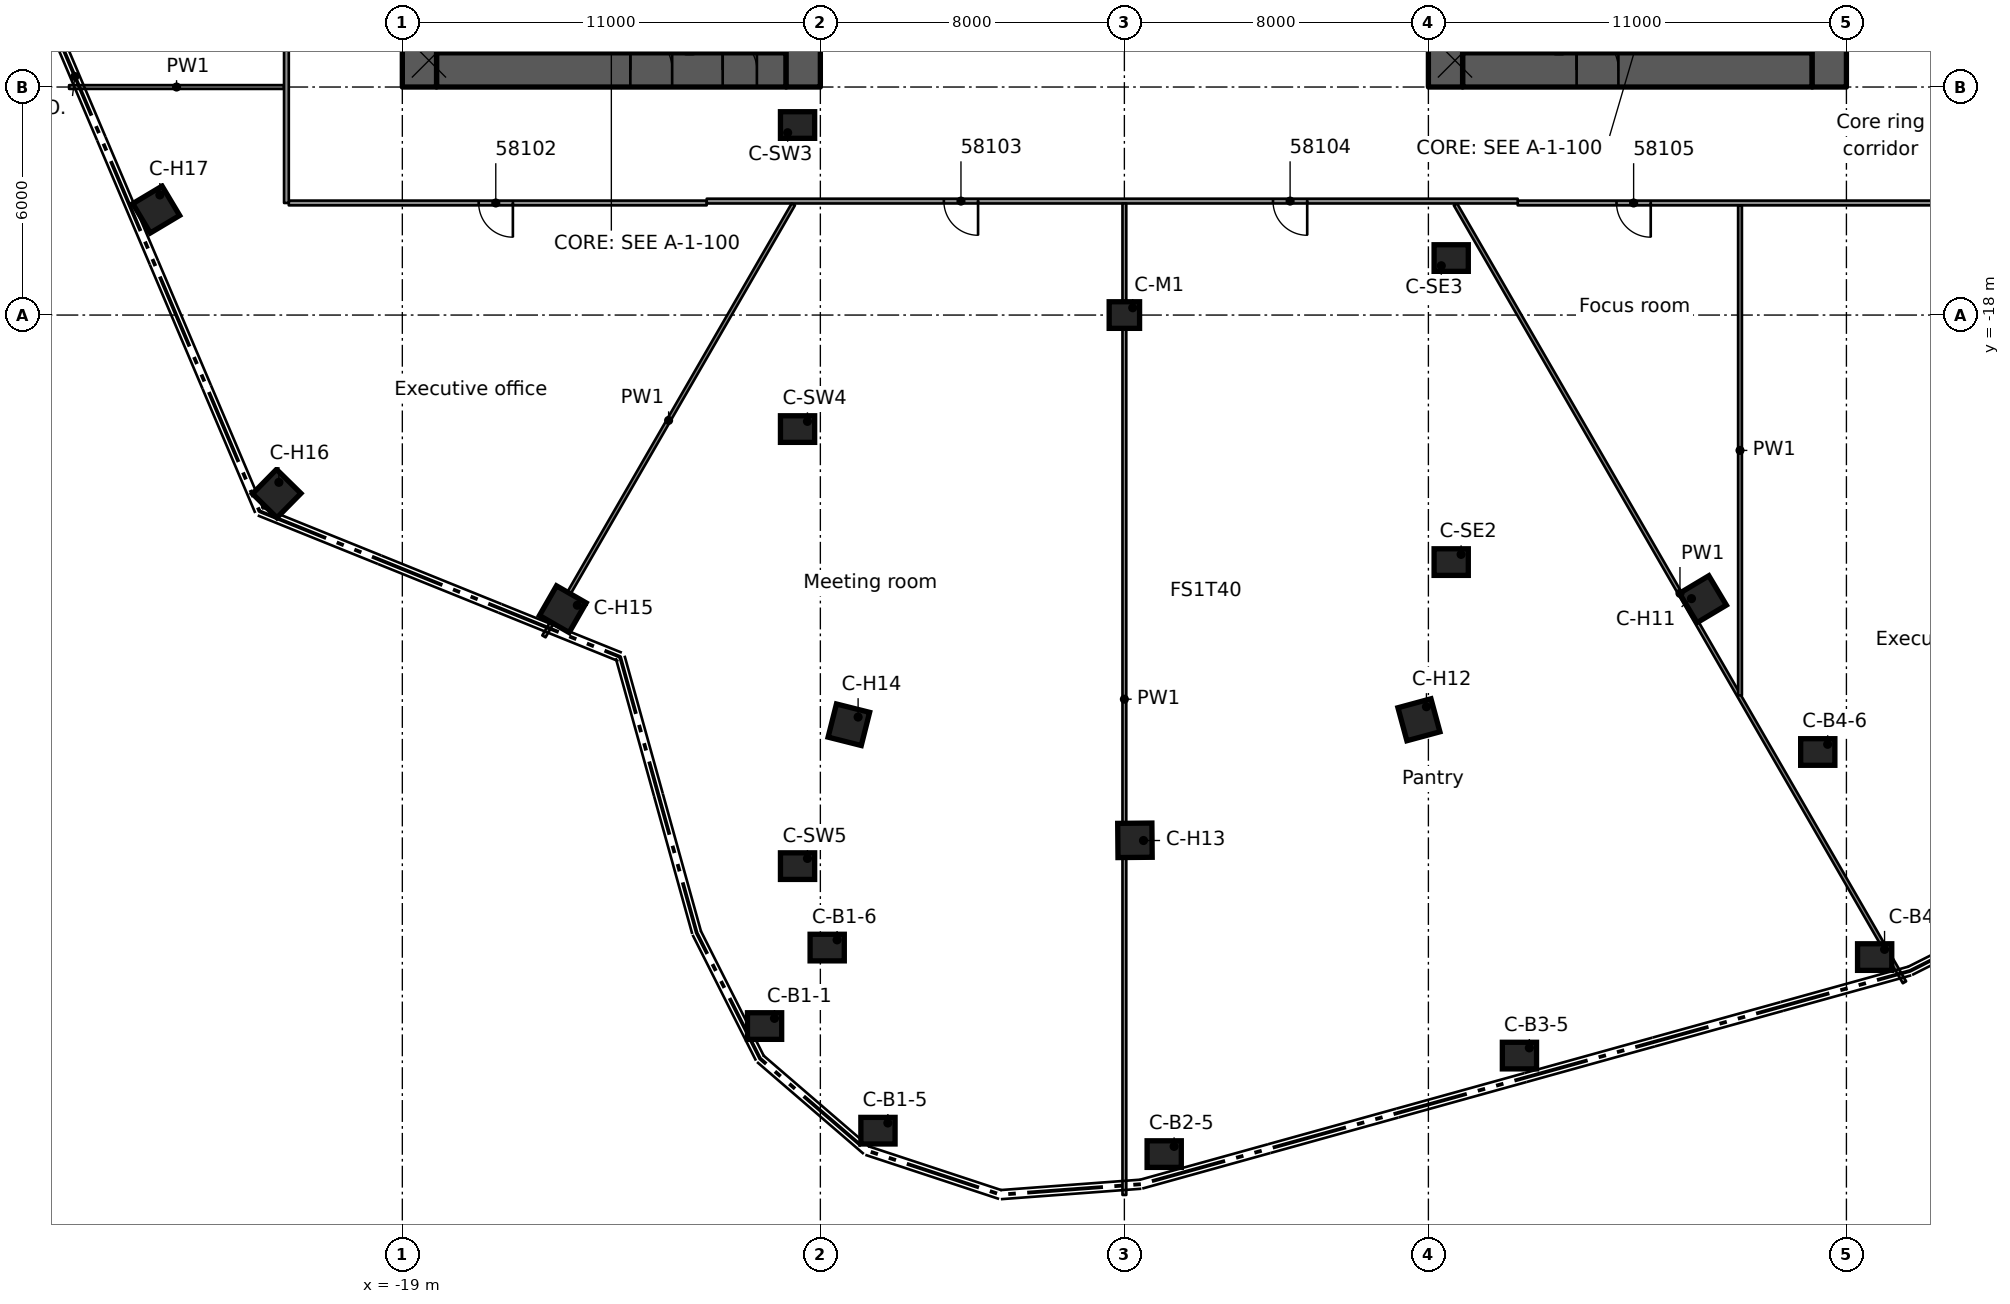
"""IFC4 building model, lengths in metres.
Left out: names, types, materials, properties, quantities, classifications, styles, units other than length and angle.
Written with IfcOpenShell. Run it as: python <this file> out.ifc"""

import sys

from ifc_helpers import new_model, si_unit, direction, frame, frame_2d, origin, origin_2d, place, context, subcontext, project, spatial, rectangle, extrude, element, fill, save


model = new_model("IFC4")
c1 = context("Model", 3, precision=1e-05, world=origin(), true_north=direction((0.0, 1.0)))
c2 = subcontext(c1, "Body", "Model", "MODEL_VIEW")
j1 = project(units=[si_unit("LENGTHUNIT", "METRE"), si_unit("PLANEANGLEUNIT", "RADIAN")], contexts=[c1])
p1 = place(None, origin())
s1 = spatial("IfcSite", under=j1, at=p1, CompositionType="ELEMENT")
p2 = place(p1, origin())
s2 = spatial("IfcBuilding", under=s1, at=p2, CompositionType="ELEMENT")
p3 = place(p2, frame((0.0, 0.0, 285.9)))
s3 = spatial("IfcBuildingStorey", under=s2, at=p3, CompositionType="ELEMENT", Elevation=285.9)
p4 = place(p3, frame((-18.1, -11.55, 0.0), z_axis=(0.0, 0.0, 1.0), x_axis=(1.0, 0.0, 0.0)))
e1 = element("IfcWall", 1, at=p4, inside=s3, PredefinedType="SHEAR", context=c2, shape_type="SweptSolid", body=[
    extrude(rectangle(XDim=9.2, YDim=0.9, at=frame_2d((4.6, 0.0))), origin(), (0.0, 0.0, 1.0), 3.5),
])
p5 = place(p4, frame((5.1, 0.0, 0.0)))
e2 = element("IfcOpeningElement", 2, at=p5, cuts=e1, PredefinedType="OPENING", context=c2, shape_type="SweptSolid", body=[
    extrude(rectangle(XDim=1.1, YDim=2.1, at=frame_2d((0.55, 1.05))), frame((0.0, 0.46, 0.0), z_axis=(0.0, -1.0, 0.0), x_axis=(1.0, 0.0, 0.0)), (0.0, 0.0, 1.0), 0.92),
])
p6 = place(p4, frame((7.53, 0.0, 0.0)))
e3 = element("IfcOpeningElement", 3, at=p6, cuts=e1, PredefinedType="OPENING", context=c2, shape_type="SweptSolid", body=[
    extrude(rectangle(XDim=0.9, YDim=2.1, at=frame_2d((0.45, 1.05))), frame((0.0, 0.46, 0.0), z_axis=(0.0, -1.0, 0.0), x_axis=(1.0, 0.0, 0.0)), (0.0, 0.0, 1.0), 0.92),
])
p7 = place(p3, frame((-18.55, -12.0, 0.0), z_axis=(0.0, 0.0, 1.0), x_axis=(0.0, 1.0, 0.0)))
e4 = element("IfcWall", 4, at=p7, inside=s3, PredefinedType="SHEAR", context=c2, shape_type="SweptSolid", body=[
    extrude(rectangle(XDim=24.0, YDim=0.9, at=frame_2d((12.0, 0.0))), origin(), (0.0, 0.0, 1.0), 3.5),
])
p8 = place(p7, frame((10.1, 0.0, 0.0)))
e5 = element("IfcOpeningElement", 5, at=p8, cuts=e4, PredefinedType="OPENING", context=c2, shape_type="SweptSolid", body=[
    extrude(rectangle(XDim=1.8, YDim=2.1, at=frame_2d((0.9, 1.05))), frame((0.0, 0.46, 0.0), z_axis=(0.0, -1.0, 0.0), x_axis=(1.0, 0.0, 0.0)), (0.0, 0.0, 1.0), 0.92),
])
p9 = place(p3, frame((-8.45, -12.0, 0.0), z_axis=(0.0, 0.0, 1.0), x_axis=(0.0, 1.0, 0.0)))
e6 = element("IfcWall", 6, at=p9, inside=s3, PredefinedType="SHEAR", context=c2, shape_type="SweptSolid", body=[
    extrude(rectangle(XDim=24.0, YDim=0.9, at=frame_2d((12.0, 0.0))), origin(), (0.0, 0.0, 1.0), 3.5),
])
p10 = place(p9, frame((9.6, 0.0, 0.0)))
e7 = element("IfcOpeningElement", 7, at=p10, cuts=e6, PredefinedType="OPENING", context=c2, shape_type="SweptSolid", body=[
    extrude(rectangle(XDim=1.8, YDim=2.1, at=frame_2d((0.9, 1.05))), frame((0.0, 0.46, 0.0), z_axis=(0.0, -1.0, 0.0), x_axis=(1.0, 0.0, 0.0)), (0.0, 0.0, 1.0), 0.92),
])
p11 = place(p9, frame((19.65, 0.0, 0.0)))
e8 = element("IfcOpeningElement", 8, at=p11, cuts=e6, PredefinedType="OPENING", context=c2, shape_type="SweptSolid", body=[
    extrude(rectangle(XDim=1.1, YDim=2.1, at=frame_2d((0.55, 1.05))), frame((0.0, 0.46, 0.0), z_axis=(0.0, -1.0, 0.0), x_axis=(1.0, 0.0, 0.0)), (0.0, 0.0, 1.0), 0.92),
])
p12 = place(p3, frame((8.9, -11.55, 0.0), z_axis=(0.0, 0.0, 1.0), x_axis=(1.0, 0.0, 0.0)))
e9 = element("IfcWall", 9, at=p12, inside=s3, PredefinedType="SHEAR", context=c2, shape_type="SweptSolid", body=[
    extrude(rectangle(XDim=9.2, YDim=0.9, at=frame_2d((4.6, 0.0))), origin(), (0.0, 0.0, 1.0), 3.5),
])
p13 = place(p12, frame((3.0, 0.0, 0.0)))
e10 = element("IfcOpeningElement", 10, at=p13, cuts=e9, PredefinedType="OPENING", context=c2, shape_type="SweptSolid", body=[
    extrude(rectangle(XDim=1.1, YDim=2.1, at=frame_2d((0.55, 1.05))), frame((0.0, 0.46, 0.0), z_axis=(0.0, -1.0, 0.0), x_axis=(1.0, 0.0, 0.0)), (0.0, 0.0, 1.0), 0.92),
])
p14 = place(p3, frame((8.45, -12.0, 0.0), z_axis=(0.0, 0.0, 1.0), x_axis=(0.0, 1.0, 0.0)))
e11 = element("IfcWall", 11, at=p14, inside=s3, PredefinedType="SHEAR", context=c2, shape_type="SweptSolid", body=[
    extrude(rectangle(XDim=24.0, YDim=0.9, at=frame_2d((12.0, 0.0))), origin(), (0.0, 0.0, 1.0), 3.5),
])
p15 = place(p14, frame((12.6, 0.0, 0.0)))
e12 = element("IfcOpeningElement", 12, at=p15, cuts=e11, PredefinedType="OPENING", context=c2, shape_type="SweptSolid", body=[
    extrude(rectangle(XDim=1.8, YDim=2.1, at=frame_2d((0.9, 1.05))), frame((0.0, 0.46, 0.0), z_axis=(0.0, -1.0, 0.0), x_axis=(1.0, 0.0, 0.0)), (0.0, 0.0, 1.0), 0.92),
])
p16 = place(p14, frame((3.25, 0.0, 0.0)))
e13 = element("IfcOpeningElement", 13, at=p16, cuts=e11, PredefinedType="OPENING", context=c2, shape_type="SweptSolid", body=[
    extrude(rectangle(XDim=1.1, YDim=2.1, at=frame_2d((0.55, 1.05))), frame((0.0, 0.46, 0.0), z_axis=(0.0, -1.0, 0.0), x_axis=(1.0, 0.0, 0.0)), (0.0, 0.0, 1.0), 0.92),
])
p17 = place(p3, frame((18.55, -12.0, 0.0), z_axis=(0.0, 0.0, 1.0), x_axis=(0.0, 1.0, 0.0)))
e14 = element("IfcWall", 14, at=p17, inside=s3, PredefinedType="SHEAR", context=c2, shape_type="SweptSolid", body=[
    extrude(rectangle(XDim=24.0, YDim=0.9, at=frame_2d((12.0, 0.0))), origin(), (0.0, 0.0, 1.0), 3.5),
])
p18 = place(p17, frame((12.1, 0.0, 0.0)))
e15 = element("IfcOpeningElement", 15, at=p18, cuts=e14, PredefinedType="OPENING", context=c2, shape_type="SweptSolid", body=[
    extrude(rectangle(XDim=1.8, YDim=2.1, at=frame_2d((0.9, 1.05))), frame((0.0, 0.46, 0.0), z_axis=(0.0, -1.0, 0.0), x_axis=(1.0, 0.0, 0.0)), (0.0, 0.0, 1.0), 0.92),
])
for number, where, z_axis, x_axis in (
    (16, (-9.468, -36.708, 0.0), (0.0, 0.0, 1.0), (1.0, 0.0, 0.0)),
    (17, (-6.484, -39.461, 0.0), (0.0, 0.0, 1.0), (1.0, 0.0, 0.0)),
    (18, (-7.82, -34.643, 0.0), (0.0, 0.0, 1.0), (1.0, 0.0, 0.0)),
    (19, (1.048, -40.077, 0.0), (0.0, 0.0, 1.0), (1.0, 0.0, 0.0)),
    (20, (10.396, -37.485, 0.0), (0.0, 0.0, 1.0), (1.0, 0.0, 0.0)),
    (21, (19.743, -34.893, 0.0), (0.0, 0.0, 1.0), (1.0, 0.0, 0.0)),
    (22, (18.246, -29.497, 0.0), (0.0, 0.0, 1.0), (1.0, 0.0, 0.0)),
):
    element("IfcColumn", number, at=place(p3, frame(where, z_axis=z_axis, x_axis=x_axis)), inside=s3, PredefinedType="COLUMN", context=c2, shape_type="SweptSolid", body=[
        extrude(rectangle(XDim=0.9, YDim=0.7, at=origin_2d()), origin(), (0.0, 0.0, 1.0), 3.5),
    ])
for number, where, z_axis, x_axis in (
    (23, (15.224, -25.477, 0.0), (0.0, 0.0, 1.0), (0.513, -0.858, 0.0)),
    (24, (7.751, -28.649, 0.0), (0.0, 0.0, 1.0), (0.261, -0.965, 0.0)),
    (25, (0.278, -31.821, 0.0), (0.0, 0.0, 1.0), (0.009, -1.0, 0.0)),
    (26, (-7.25, -28.78, 0.0), (0.0, 0.0, 1.0), (-0.244, -0.97, 0.0)),
    (27, (-14.777, -25.739, 0.0), (0.0, 0.0, 1.0), (-0.498, -0.867, 0.0)),
    (28, (-22.305, -22.697, 0.0), (0.0, 0.0, 1.0), (-0.701, -0.713, 0.0)),
    (29, (-25.477, -15.224, 0.0), (0.0, 0.0, 1.0), (-0.858, -0.513, 0.0)),
):
    element("IfcColumn", number, at=place(p3, frame(where, z_axis=z_axis, x_axis=x_axis)), inside=s3, PredefinedType="COLUMN", context=c2, shape_type="SweptSolid", body=[
        extrude(rectangle(XDim=0.9, YDim=0.9, at=origin_2d()), origin(), (0.0, 0.0, 1.0), 3.5),
    ])
p19 = place(p3, frame((0.0, -18.0, 0.0), z_axis=(0.0, 0.0, 1.0), x_axis=(1.0, 0.0, 0.0)))
e30 = element("IfcColumn", 30, at=p19, inside=s3, PredefinedType="COLUMN", context=c2, shape_type="SweptSolid", body=[
    extrude(rectangle(XDim=0.8, YDim=0.7, at=origin_2d()), origin(), (0.0, 0.0, 1.0), 3.5),
])
for number, where, z_axis, x_axis in (
    (31, (8.6, -24.5, 0.0), (0.0, 0.0, 1.0), (1.0, 0.0, 0.0)),
    (32, (8.6, -16.5, 0.0), (0.0, 0.0, 1.0), (1.0, 0.0, 0.0)),
    (33, (-8.6, -13.0, 0.0), (0.0, 0.0, 1.0), (1.0, 0.0, 0.0)),
    (34, (-8.6, -21.0, 0.0), (0.0, 0.0, 1.0), (1.0, 0.0, 0.0)),
    (35, (-8.6, -32.5, 0.0), (0.0, 0.0, 1.0), (1.0, 0.0, 0.0)),
):
    element("IfcColumn", number, at=place(p3, frame(where, z_axis=z_axis, x_axis=x_axis)), inside=s3, PredefinedType="COLUMN", context=c2, shape_type="SweptSolid", body=[
        extrude(rectangle(XDim=0.9, YDim=0.7, at=origin_2d()), origin(), (0.0, 0.0, 1.0), 3.5),
    ])
p20 = place(p3, frame((-11.44, -11.1, 0.0), z_axis=(0.0, 0.0, 1.0), x_axis=(0.0, 1.0, 0.0)))
e36 = element("IfcWall", 36, at=p20, inside=s3, PredefinedType="SOLIDWALL", context=c2, shape_type="SweptSolid", body=[
    extrude(rectangle(XDim=4.125, YDim=0.2, at=frame_2d((2.062, 0.0))), origin(), (0.0, 0.0, 1.0), 3.09),
])
p21 = place(p3, frame((11.44, -6.975, 0.0), z_axis=(0.0, 0.0, 1.0), x_axis=(0.0, -1.0, 0.0)))
e37 = element("IfcWall", 37, at=p21, inside=s3, PredefinedType="SOLIDWALL", context=c2, shape_type="SweptSolid", body=[
    extrude(rectangle(XDim=4.125, YDim=0.2, at=frame_2d((2.062, 0.0))), origin(), (0.0, 0.0, 1.0), 3.09),
])
p22 = place(p21, frame((2.1, 0.0, 0.0)))
e38 = element("IfcOpeningElement", 38, at=p22, cuts=e37, PredefinedType="OPENING", context=c2, shape_type="SweptSolid", body=[
    extrude(rectangle(XDim=1.1, YDim=2.1, at=frame_2d((0.55, 1.05))), frame((0.0, 0.11, 0.0), z_axis=(0.0, -1.0, 0.0), x_axis=(1.0, 0.0, 0.0)), (0.0, 0.0, 1.0), 0.22),
])
p23 = place(p3, frame((8.712, -15.088, 0.0), z_axis=(0.0, 0.0, 1.0), x_axis=(0.499948681642, -0.866055030425, 0.0)))
e39 = element("IfcWall", 39, at=p23, inside=s3, PredefinedType="PARTITIONING", context=c2, shape_type="SweptSolid", body=[
    extrude(rectangle(XDim=23.635, YDim=0.1, at=frame_2d((11.817, 0.0))), origin(), (0.0, 0.0, 1.0), 3.08),
])
p24 = place(p3, frame((-10.991, -15.051, 0.0), z_axis=(0.0, 0.0, 1.0), x_axis=(-1.0, 0.0, 0.0)))
e40 = element("IfcWall", 40, at=p24, inside=s3, PredefinedType="PARTITIONING", context=c2, shape_type="SweptSolid", body=[
    extrude(rectangle(XDim=10.997, YDim=0.125, at=frame_2d((5.499, 0.0))), origin(), (0.0, 0.0, 1.0), 3.08),
])
p25 = place(p24, frame((5.1, 0.0, 0.0)))
e41 = element("IfcOpeningElement", 41, at=p25, cuts=e40, PredefinedType="OPENING", context=c2, shape_type="SweptSolid", body=[
    extrude(rectangle(XDim=0.9, YDim=2.1, at=frame_2d((0.45, 1.05))), frame((0.0, 0.073, 0.0), z_axis=(0.0, -1.0, 0.0), x_axis=(1.0, 0.0, 0.0)), (0.0, 0.0, 1.0), 0.145),
])
p26 = place(p3, frame((21.988, -15.051, 0.0), z_axis=(0.0, 0.0, 1.0), x_axis=(-1.0, 0.0, 0.0)))
e42 = element("IfcWall", 42, at=p26, inside=s3, PredefinedType="PARTITIONING", context=c2, shape_type="SweptSolid", body=[
    extrude(rectangle(XDim=11.638, YDim=0.125, at=frame_2d((5.819, 0.0))), origin(), (0.0, 0.0, 1.0), 3.08),
])
p27 = place(p26, frame((8.137, 0.0, 0.0)))
e43 = element("IfcOpeningElement", 43, at=p27, cuts=e42, PredefinedType="OPENING", context=c2, shape_type="SweptSolid", body=[
    extrude(rectangle(XDim=0.9, YDim=2.1, at=frame_2d((0.45, 1.05))), frame((0.0, 0.073, 0.0), z_axis=(0.0, -1.0, 0.0), x_axis=(1.0, 0.0, 0.0)), (0.0, 0.0, 1.0), 0.145),
])
p28 = place(p3, frame((10.349, -15.001, 0.0), z_axis=(0.0, 0.0, 1.0), x_axis=(-1.0, 0.0, 0.0)))
e44 = element("IfcWall", 44, at=p28, inside=s3, PredefinedType="PARTITIONING", context=c2, shape_type="SweptSolid", body=[
    extrude(rectangle(XDim=21.339, YDim=0.125, at=frame_2d((10.669, 0.0))), origin(), (0.0, 0.0, 1.0), 3.08),
])
p29 = place(p28, frame((14.199, 0.0, 0.0)))
e45 = element("IfcOpeningElement", 45, at=p29, cuts=e44, PredefinedType="OPENING", context=c2, shape_type="SweptSolid", body=[
    extrude(rectangle(XDim=0.9, YDim=2.1, at=frame_2d((0.45, 1.05))), frame((0.0, 0.073, 0.0), z_axis=(0.0, -1.0, 0.0), x_axis=(1.0, 0.0, 0.0)), (0.0, 0.0, 1.0), 0.145),
])
p30 = place(p28, frame((5.538, 0.0, 0.0)))
e46 = element("IfcOpeningElement", 46, at=p30, cuts=e44, PredefinedType="OPENING", context=c2, shape_type="SweptSolid", body=[
    extrude(rectangle(XDim=0.9, YDim=2.1, at=frame_2d((0.45, 1.05))), frame((0.0, 0.073, 0.0), z_axis=(0.0, -1.0, 0.0), x_axis=(1.0, 0.0, 0.0)), (0.0, 0.0, 1.0), 0.145),
])
p31 = place(p3, frame((-27.769, -12.0, 0.0), z_axis=(0.0, 0.0, 1.0), x_axis=(1.0, 0.0, 0.0)))
e47 = element("IfcWall", 47, at=p31, inside=s3, PredefinedType="PARTITIONING", context=c2, shape_type="SweptSolid", body=[
    extrude(rectangle(XDim=5.656, YDim=0.1, at=frame_2d((2.828, 0.0))), origin(), (0.0, 0.0, 1.0), 3.08),
])
p32 = place(p3, frame((-15.274, -26.455, 0.0), z_axis=(0.0, 0.0, 1.0), x_axis=(0.499992441188, 0.866029767822, 0.0)))
e48 = element("IfcWall", 48, at=p32, inside=s3, PredefinedType="PARTITIONING", context=c2, shape_type="SweptSolid", body=[
    extrude(rectangle(XDim=13.124, YDim=0.1, at=frame_2d((6.562, 0.0))), origin(), (0.0, 0.0, 1.0), 3.08),
])
p33 = place(p3, frame((16.2, -28.009, 0.0), z_axis=(0.0, 0.0, 1.0), x_axis=(0.0, 1.0, 0.0)))
e49 = element("IfcWall", 49, at=p33, inside=s3, PredefinedType="PARTITIONING", context=c2, shape_type="SweptSolid", body=[
    extrude(rectangle(XDim=12.895, YDim=0.1, at=frame_2d((6.448, 0.0))), origin(), (0.0, 0.0, 1.0), 3.08),
])
p34 = place(p3, frame((0.0, -41.152, 0.0), z_axis=(0.0, 0.0, 1.0), x_axis=(0.0, 1.0, 0.0)))
e50 = element("IfcWall", 50, at=p34, inside=s3, PredefinedType="PARTITIONING", context=c2, shape_type="SweptSolid", body=[
    extrude(rectangle(XDim=26.089, YDim=0.1, at=frame_2d((13.044, 0.0))), origin(), (0.0, 0.0, 1.0), 3.08),
])
p35 = place(p3, frame((-22.05, -15.051, 0.0), z_axis=(0.0, 0.0, 1.0), x_axis=(0.0, 1.0, 0.0)))
e51 = element("IfcWall", 51, at=p35, inside=s3, PredefinedType="PARTITIONING", context=c2, shape_type="SweptSolid", body=[
    extrude(rectangle(XDim=30.102, YDim=0.125, at=frame_2d((15.051, 0.0))), origin(), (0.0, 0.0, 1.0), 3.08),
])
p36 = place(p35, frame((8.151, 0.0, 0.0)))
e52 = element("IfcOpeningElement", 52, at=p36, cuts=e51, PredefinedType="OPENING", context=c2, shape_type="SweptSolid", body=[
    extrude(rectangle(XDim=1.8, YDim=2.1, at=frame_2d((0.9, 1.05))), frame((0.0, 0.073, 0.0), z_axis=(0.0, -1.0, 0.0), x_axis=(1.0, 0.0, 0.0)), (0.0, 0.0, 1.0), 0.145),
])
p37 = place(p35, frame((12.401, 0.0, 0.0)))
e53 = element("IfcOpeningElement", 53, at=p37, cuts=e51, PredefinedType="OPENING", context=c2, shape_type="SweptSolid", body=[
    extrude(rectangle(XDim=1.8, YDim=2.1, at=frame_2d((0.9, 1.05))), frame((0.0, 0.073, 0.0), z_axis=(0.0, -1.0, 0.0), x_axis=(1.0, 0.0, 0.0)), (0.0, 0.0, 1.0), 0.145),
])
p38 = place(p35, frame((23.652, 0.0, 0.0)))
e54 = element("IfcOpeningElement", 54, at=p38, cuts=e51, PredefinedType="OPENING", context=c2, shape_type="SweptSolid", body=[
    extrude(rectangle(XDim=0.9, YDim=2.1, at=frame_2d((0.45, 1.05))), frame((0.0, 0.073, 0.0), z_axis=(0.0, -1.0, 0.0), x_axis=(1.0, 0.0, 0.0)), (0.0, 0.0, 1.0), 0.145),
])
p39 = place(p35, frame((17.403, 0.0, 0.0)))
e55 = element("IfcOpeningElement", 55, at=p39, cuts=e51, PredefinedType="OPENING", context=c2, shape_type="SweptSolid", body=[
    extrude(rectangle(XDim=1.1, YDim=2.1, at=frame_2d((0.55, 1.05))), frame((0.0, 0.073, 0.0), z_axis=(0.0, -1.0, 0.0), x_axis=(1.0, 0.0, 0.0)), (0.0, 0.0, 1.0), 0.145),
])
p40 = place(p5, origin())
e56 = element("IfcDoor", 56, at=p40, inside=s3, OperationType="SINGLE_SWING_RIGHT", PredefinedType="DOOR", context=c2, shape_type="SweptSolid", body=[
    extrude(rectangle(XDim=1.1, YDim=2.1, at=frame_2d((0.55, 1.05))), frame((0.0, 0.025, 0.0), z_axis=(0.0, -1.0, 0.0), x_axis=(1.0, 0.0, 0.0)), (0.0, 0.0, 1.0), 0.05),
])
fill(e2, e56)
p41 = place(p6, origin())
e57 = element("IfcDoor", 57, at=p41, inside=s3, OperationType="SINGLE_SWING_RIGHT", PredefinedType="DOOR", context=c2, shape_type="SweptSolid", body=[
    extrude(rectangle(XDim=0.9, YDim=2.1, at=frame_2d((0.45, 1.05))), frame((0.0, 0.025, 0.0), z_axis=(0.0, -1.0, 0.0), x_axis=(1.0, 0.0, 0.0)), (0.0, 0.0, 1.0), 0.05),
])
fill(e3, e57)
p42 = place(p13, origin())
e58 = element("IfcDoor", 58, at=p42, inside=s3, OperationType="SINGLE_SWING_LEFT", PredefinedType="DOOR", context=c2, shape_type="SweptSolid", body=[
    extrude(rectangle(XDim=1.1, YDim=2.1, at=frame_2d((0.55, 1.05))), frame((0.0, 0.025, 0.0), z_axis=(0.0, -1.0, 0.0), x_axis=(1.0, 0.0, 0.0)), (0.0, 0.0, 1.0), 0.05),
])
fill(e10, e58)
p43 = place(p25, origin())
e59 = element("IfcDoor", 59, at=p43, inside=s3, OperationType="SINGLE_SWING_RIGHT", PredefinedType="DOOR", context=c2, shape_type="SweptSolid", body=[
    extrude(rectangle(XDim=0.9, YDim=2.1, at=frame_2d((0.45, 1.05))), frame((0.0, 0.025, 0.0), z_axis=(0.0, -1.0, 0.0), x_axis=(1.0, 0.0, 0.0)), (0.0, 0.0, 1.0), 0.05),
])
fill(e41, e59)
p44 = place(p29, origin())
e60 = element("IfcDoor", 60, at=p44, inside=s3, OperationType="SINGLE_SWING_RIGHT", PredefinedType="DOOR", context=c2, shape_type="SweptSolid", body=[
    extrude(rectangle(XDim=0.9, YDim=2.1, at=frame_2d((0.45, 1.05))), frame((0.0, 0.025, 0.0), z_axis=(0.0, -1.0, 0.0), x_axis=(1.0, 0.0, 0.0)), (0.0, 0.0, 1.0), 0.05),
])
fill(e45, e60)
p45 = place(p30, origin())
e61 = element("IfcDoor", 61, at=p45, inside=s3, OperationType="SINGLE_SWING_LEFT", PredefinedType="DOOR", context=c2, shape_type="SweptSolid", body=[
    extrude(rectangle(XDim=0.9, YDim=2.1, at=frame_2d((0.45, 1.05))), frame((0.0, 0.025, 0.0), z_axis=(0.0, -1.0, 0.0), x_axis=(1.0, 0.0, 0.0)), (0.0, 0.0, 1.0), 0.05),
])
fill(e46, e61)
p46 = place(p27, origin())
e62 = element("IfcDoor", 62, at=p46, inside=s3, OperationType="SINGLE_SWING_RIGHT", PredefinedType="DOOR", context=c2, shape_type="SweptSolid", body=[
    extrude(rectangle(XDim=0.9, YDim=2.1, at=frame_2d((0.45, 1.05))), frame((0.0, 0.025, 0.0), z_axis=(0.0, -1.0, 0.0), x_axis=(1.0, 0.0, 0.0)), (0.0, 0.0, 1.0), 0.05),
])
fill(e43, e62)
save(model, sys.argv[1])
